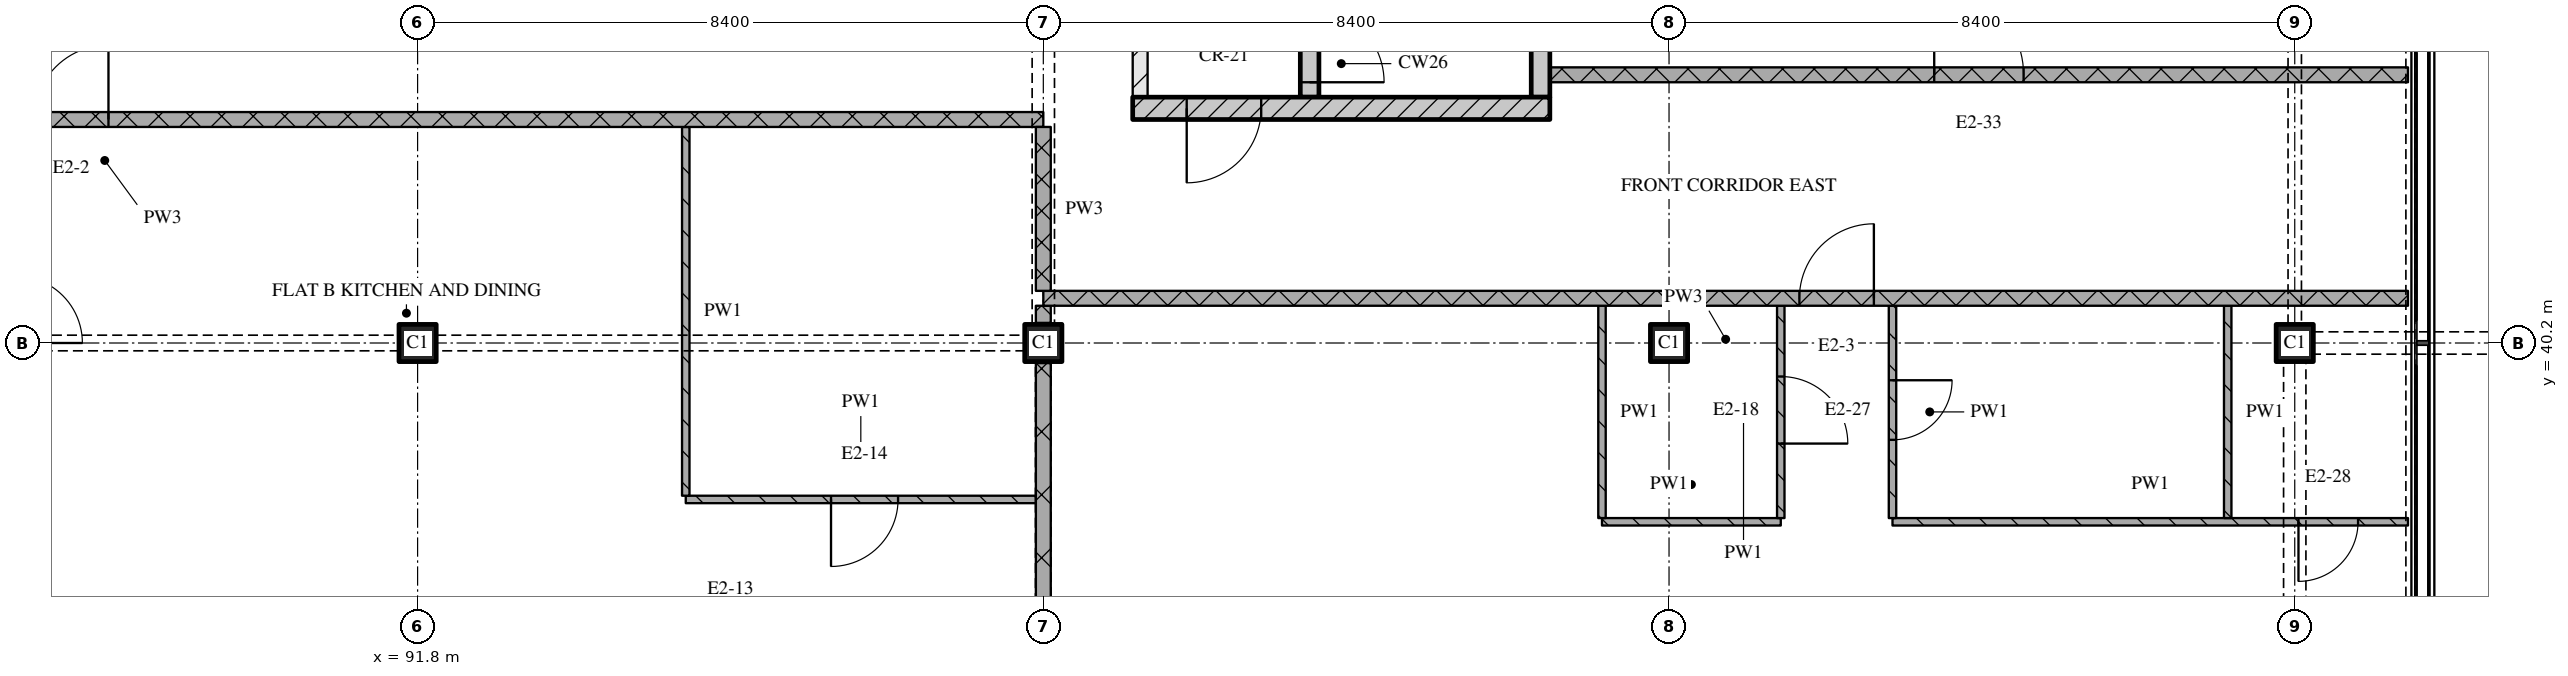
"""IFC4 building model, lengths in metres.
Left out: names, types, materials, properties, quantities, classifications, styles, units other than length and angle.
Written with IfcOpenShell. Run it as: python <this file> out.ifc"""

import sys

from ifc_helpers import new_model, si_unit, direction, frame, frame_2d, origin, origin_2d, place, context, subcontext, project, spatial, rectangle, extrude, element, fill, save


model = new_model("IFC4")
c1 = context("Model", 3, precision=1e-05, world=origin(), true_north=direction((0.0, 1.0)))
c2 = subcontext(c1, "Body", "Model", "MODEL_VIEW")
j1 = project(units=[si_unit("LENGTHUNIT", "METRE"), si_unit("PLANEANGLEUNIT", "RADIAN")], contexts=[c1])
p1 = place(None, origin())
s1 = spatial("IfcSite", under=j1, at=p1, CompositionType="ELEMENT")
p2 = place(p1, origin())
s2 = spatial("IfcBuilding", under=s1, at=p2, CompositionType="ELEMENT")
p3 = place(p2, frame((0.0, 0.0, 270.75)))
s3 = spatial("IfcBuildingStorey", under=s2, at=p3, CompositionType="ELEMENT", Elevation=270.75)
for number, where, z_axis, x_axis in (
    (1, (91.8, 40.2, 0.0), (0.0, 0.0, 1.0), (1.0, 0.0, 0.0)),
    (2, (100.2, 40.2, 0.0), (0.0, 0.0, 1.0), (1.0, 0.0, 0.0)),
    (3, (108.6, 40.2, 0.0), (0.0, 0.0, 1.0), (1.0, 0.0, 0.0)),
    (4, (117.0, 40.2, 0.0), (0.0, 0.0, 1.0), (1.0, 0.0, 0.0)),
):
    element("IfcColumn", number, at=place(p3, frame(where, z_axis=z_axis, x_axis=x_axis)), inside=s3, PredefinedType="COLUMN", context=c2, shape_type="SweptSolid", body=[
        extrude(rectangle(XDim=0.5, YDim=0.5, at=origin_2d()), origin(), (0.0, 0.0, 1.0), 3.6),
    ])
p4 = place(p3, frame((101.4, 43.35, 0.0), z_axis=(0.0, 0.0, 1.0), x_axis=(1.0, 0.0, 0.0)))
e5 = element("IfcWall", 5, at=p4, inside=s3, PredefinedType="SOLIDWALL", context=c2, shape_type="SweptSolid", body=[
    extrude(rectangle(XDim=5.6, YDim=0.3, at=frame_2d((2.8, 0.0))), origin(), (0.0, 0.0, 1.0), 3.32),
])
p5 = place(p4, frame((0.725, 0.0, 0.0)))
e6 = element("IfcOpeningElement", 6, at=p5, cuts=e5, PredefinedType="OPENING", context=c2, shape_type="SweptSolid", body=[
    extrude(rectangle(XDim=1.0, YDim=2.1, at=frame_2d((0.5, 1.05))), frame((0.0, 0.16, 0.0), z_axis=(0.0, -1.0, 0.0), x_axis=(1.0, 0.0, 0.0)), (0.0, 0.0, 1.0), 0.32),
])
p6 = place(p3, frame((101.5, 43.5, 0.0), z_axis=(0.0, 0.0, 1.0), x_axis=(0.0, 1.0, 0.0)))
e7 = element("IfcWall", 7, at=p6, inside=s3, PredefinedType="PARTITIONING", context=c2, shape_type="SweptSolid", body=[
    extrude(rectangle(XDim=6.9, YDim=0.2, at=frame_2d((3.45, 0.0))), origin(), (0.0, 0.0, 1.0), 3.32),
])
p7 = place(p6, frame((1.0, 0.0, 0.0)))
e8 = element("IfcOpeningElement", 8, at=p7, cuts=e7, PredefinedType="OPENING", context=c2, shape_type="SweptSolid", body=[
    extrude(rectangle(XDim=1.0, YDim=2.1, at=frame_2d((0.5, 1.05))), frame((0.0, 0.11, 0.0), z_axis=(0.0, -1.0, 0.0), x_axis=(1.0, 0.0, 0.0)), (0.0, 0.0, 1.0), 0.22),
])
p8 = place(p3, frame((103.775, 43.5, 0.0), z_axis=(0.0, 0.0, 1.0), x_axis=(0.0, 1.0, 0.0)))
e9 = element("IfcWall", 9, at=p8, inside=s3, PredefinedType="SOLIDWALL", context=c2, shape_type="SweptSolid", body=[
    extrude(rectangle(XDim=6.9, YDim=0.25, at=frame_2d((3.45, 0.0))), origin(), (0.0, 0.0, 1.0), 3.32),
])
p9 = place(p8, frame((0.2, 0.0, 0.0)))
e10 = element("IfcOpeningElement", 10, at=p9, cuts=e9, PredefinedType="OPENING", context=c2, shape_type="SweptSolid", body=[
    extrude(rectangle(XDim=1.0, YDim=2.1, at=frame_2d((0.5, 1.05))), frame((0.0, 0.135, 0.0), z_axis=(0.0, -1.0, 0.0), x_axis=(1.0, 0.0, 0.0)), (0.0, 0.0, 1.0), 0.27),
])
p10 = place(p3, frame((106.875, 43.5, 0.0), z_axis=(0.0, 0.0, 1.0), x_axis=(0.0, 1.0, 0.0)))
e11 = element("IfcWall", 11, at=p10, inside=s3, PredefinedType="SOLIDWALL", context=c2, shape_type="SweptSolid", body=[
    extrude(rectangle(XDim=6.9, YDim=0.25, at=frame_2d((3.45, 0.0))), origin(), (0.0, 0.0, 1.0), 3.32),
])
p11 = place(p3, frame((107.7, 37.8, 0.0), z_axis=(0.0, 0.0, 1.0), x_axis=(1.0, 0.0, 0.0)))
e12 = element("IfcWall", 12, at=p11, inside=s3, PredefinedType="PARTITIONING", context=c2, shape_type="SweptSolid", body=[
    extrude(rectangle(XDim=2.4, YDim=0.1, at=frame_2d((1.2, 0.0))), origin(), (0.0, 0.0, 1.0), 3.32),
])
p12 = place(p3, frame((111.6, 37.8, 0.0), z_axis=(0.0, 0.0, 1.0), x_axis=(1.0, 0.0, 0.0)))
e13 = element("IfcWall", 13, at=p12, inside=s3, PredefinedType="PARTITIONING", context=c2, shape_type="SweptSolid", body=[
    extrude(rectangle(XDim=6.92, YDim=0.1, at=frame_2d((3.46, 0.0))), origin(), (0.0, 0.0, 1.0), 3.32),
])
p13 = place(p12, frame((5.45, 0.0, 0.0)))
e14 = element("IfcOpeningElement", 14, at=p13, cuts=e13, PredefinedType="OPENING", context=c2, shape_type="SweptSolid", body=[
    extrude(rectangle(XDim=0.8, YDim=2.1, at=frame_2d((0.4, 1.05))), frame((0.0, 0.06, 0.0), z_axis=(0.0, -1.0, 0.0), x_axis=(1.0, 0.0, 0.0)), (0.0, 0.0, 1.0), 0.12),
])
p14 = place(p3, frame((95.4, 38.1, 0.0), z_axis=(0.0, 0.0, 1.0), x_axis=(1.0, 0.0, 0.0)))
e15 = element("IfcWall", 15, at=p14, inside=s3, PredefinedType="PARTITIONING", context=c2, shape_type="SweptSolid", body=[
    extrude(rectangle(XDim=4.7, YDim=0.1, at=frame_2d((2.35, 0.0))), origin(), (0.0, 0.0, 1.0), 3.32),
])
p15 = place(p14, frame((1.95, 0.0, 0.0)))
e16 = element("IfcOpeningElement", 16, at=p15, cuts=e15, PredefinedType="OPENING", context=c2, shape_type="SweptSolid", body=[
    extrude(rectangle(XDim=0.9, YDim=2.1, at=frame_2d((0.45, 1.05))), frame((0.0, 0.06, 0.0), z_axis=(0.0, -1.0, 0.0), x_axis=(1.0, 0.0, 0.0)), (0.0, 0.0, 1.0), 0.12),
])
p16 = place(p3, frame((118.52, 40.8, 0.0), z_axis=(0.0, 0.0, 1.0), x_axis=(-1.0, 0.0, 0.0)))
e17 = element("IfcWall", 17, at=p16, inside=s3, PredefinedType="PARTITIONING", context=c2, shape_type="SweptSolid", body=[
    extrude(rectangle(XDim=18.32, YDim=0.2, at=frame_2d((9.16, 0.0))), origin(), (0.0, 0.0, 1.0), 3.32),
])
p17 = place(p16, frame((7.17, 0.0, 0.0)))
e18 = element("IfcOpeningElement", 18, at=p17, cuts=e17, PredefinedType="OPENING", context=c2, shape_type="SweptSolid", body=[
    extrude(rectangle(XDim=1.0, YDim=2.1, at=frame_2d((0.5, 1.05))), frame((0.0, 0.11, 0.0), z_axis=(0.0, -1.0, 0.0), x_axis=(1.0, 0.0, 0.0)), (0.0, 0.0, 1.0), 0.22),
])
p18 = place(p3, frame((100.2, 43.2, 0.0), z_axis=(0.0, 0.0, 1.0), x_axis=(-1.0, 0.0, 0.0)))
e19 = element("IfcWall", 19, at=p18, inside=s3, PredefinedType="PARTITIONING", context=c2, shape_type="SweptSolid", body=[
    extrude(rectangle(XDim=25.2, YDim=0.2, at=frame_2d((12.6, 0.0))), origin(), (0.0, 0.0, 1.0), 3.32),
])
p19 = place(p18, frame((12.55, 0.0, 0.0)))
e20 = element("IfcOpeningElement", 20, at=p19, cuts=e19, PredefinedType="OPENING", context=c2, shape_type="SweptSolid", body=[
    extrude(rectangle(XDim=1.0, YDim=2.1, at=frame_2d((0.5, 1.05))), frame((0.0, 0.11, 0.0), z_axis=(0.0, -1.0, 0.0), x_axis=(1.0, 0.0, 0.0)), (0.0, 0.0, 1.0), 0.22),
])
p20 = place(p3, frame((107.0, 43.8, 0.0), z_axis=(0.0, 0.0, 1.0), x_axis=(1.0, 0.0, 0.0)))
e21 = element("IfcWall", 21, at=p20, inside=s3, PredefinedType="PARTITIONING", context=c2, shape_type="SweptSolid", body=[
    extrude(rectangle(XDim=11.52, YDim=0.2, at=frame_2d((5.76, 0.0))), origin(), (0.0, 0.0, 1.0), 3.32),
])
p21 = place(p20, frame((5.16, 0.0, 0.0)))
e22 = element("IfcOpeningElement", 22, at=p21, cuts=e21, PredefinedType="OPENING", context=c2, shape_type="SweptSolid", body=[
    extrude(rectangle(XDim=1.2, YDim=2.1, at=frame_2d((0.6, 1.05))), frame((0.0, 0.11, 0.0), z_axis=(0.0, -1.0, 0.0), x_axis=(1.0, 0.0, 0.0)), (0.0, 0.0, 1.0), 0.22),
])
p22 = place(p3, frame((95.4, 43.1, 0.0), z_axis=(0.0, 0.0, 1.0), x_axis=(0.0, -1.0, 0.0)))
e23 = element("IfcWall", 23, at=p22, inside=s3, PredefinedType="PARTITIONING", context=c2, shape_type="SweptSolid", body=[
    extrude(rectangle(XDim=4.95, YDim=0.1, at=frame_2d((2.475, 0.0))), origin(), (0.0, 0.0, 1.0), 3.32),
])
p23 = place(p3, frame((100.2, 43.1, 0.0), z_axis=(0.0, 0.0, 1.0), x_axis=(0.0, -1.0, 0.0)))
e24 = element("IfcWall", 24, at=p23, inside=s3, PredefinedType="PARTITIONING", context=c2, shape_type="SweptSolid", body=[
    extrude(rectangle(XDim=2.2, YDim=0.2, at=frame_2d((1.1, 0.0))), origin(), (0.0, 0.0, 1.0), 2.53),
])
p24 = place(p3, frame((100.2, 39.93, 0.0), z_axis=(0.0, 0.0, 1.0), x_axis=(0.0, -1.0, 0.0)))
e25 = element("IfcWall", 25, at=p24, inside=s3, PredefinedType="PARTITIONING", context=c2, shape_type="SweptSolid", body=[
    extrude(rectangle(XDim=7.86, YDim=0.2, at=frame_2d((3.93, 0.0))), origin(), (0.0, 0.0, 1.0), 2.77),
])
p25 = place(p3, frame((100.2, 40.7, 0.0), z_axis=(0.0, 0.0, 1.0), x_axis=(0.0, -1.0, 0.0)))
e26 = element("IfcWall", 26, at=p25, inside=s3, PredefinedType="PARTITIONING", context=c2, shape_type="SweptSolid", body=[
    extrude(rectangle(XDim=0.23, YDim=0.2, at=frame_2d((0.115, 0.0))), origin(), (0.0, 0.0, 1.0), 3.32),
])
p26 = place(p3, frame((107.7, 40.7, 0.0), z_axis=(0.0, 0.0, 1.0), x_axis=(0.0, -1.0, 0.0)))
e27 = element("IfcWall", 27, at=p26, inside=s3, PredefinedType="PARTITIONING", context=c2, shape_type="SweptSolid", body=[
    extrude(rectangle(XDim=2.85, YDim=0.1, at=frame_2d((1.425, 0.0))), origin(), (0.0, 0.0, 1.0), 3.32),
])
p27 = place(p3, frame((110.1, 37.85, 0.0), z_axis=(0.0, 0.0, 1.0), x_axis=(0.0, 1.0, 0.0)))
e28 = element("IfcWall", 28, at=p27, inside=s3, PredefinedType="PARTITIONING", context=c2, shape_type="SweptSolid", body=[
    extrude(rectangle(XDim=2.85, YDim=0.1, at=frame_2d((1.425, 0.0))), origin(), (0.0, 0.0, 1.0), 3.32),
])
p28 = place(p27, frame((1.0, 0.0, 0.0)))
e29 = element("IfcOpeningElement", 29, at=p28, cuts=e28, PredefinedType="OPENING", context=c2, shape_type="SweptSolid", body=[
    extrude(rectangle(XDim=0.9, YDim=2.1, at=frame_2d((0.45, 1.05))), frame((0.0, 0.06, 0.0), z_axis=(0.0, -1.0, 0.0), x_axis=(1.0, 0.0, 0.0)), (0.0, 0.0, 1.0), 0.12),
])
p29 = place(p3, frame((111.6, 40.7, 0.0), z_axis=(0.0, 0.0, 1.0), x_axis=(0.0, -1.0, 0.0)))
e30 = element("IfcWall", 30, at=p29, inside=s3, PredefinedType="PARTITIONING", context=c2, shape_type="SweptSolid", body=[
    extrude(rectangle(XDim=2.85, YDim=0.1, at=frame_2d((1.425, 0.0))), origin(), (0.0, 0.0, 1.0), 3.32),
])
p30 = place(p29, frame((1.0, 0.0, 0.0)))
e31 = element("IfcOpeningElement", 31, at=p30, cuts=e30, PredefinedType="OPENING", context=c2, shape_type="SweptSolid", body=[
    extrude(rectangle(XDim=0.8, YDim=2.1, at=frame_2d((0.4, 1.05))), frame((0.0, 0.06, 0.0), z_axis=(0.0, -1.0, 0.0), x_axis=(1.0, 0.0, 0.0)), (0.0, 0.0, 1.0), 0.12),
])
p31 = place(p3, frame((116.1, 40.7, 0.0), z_axis=(0.0, 0.0, 1.0), x_axis=(0.0, -1.0, 0.0)))
e32 = element("IfcWall", 32, at=p31, inside=s3, PredefinedType="PARTITIONING", context=c2, shape_type="SweptSolid", body=[
    extrude(rectangle(XDim=2.85, YDim=0.1, at=frame_2d((1.425, 0.0))), origin(), (0.0, 0.0, 1.0), 3.32),
])
p32 = place(p5, origin())
e33 = element("IfcDoor", 33, at=p32, inside=s3, OperationType="SINGLE_SWING_RIGHT", PredefinedType="DOOR", context=c2, shape_type="SweptSolid", body=[
    extrude(rectangle(XDim=1.0, YDim=2.1, at=frame_2d((0.5, 1.05))), frame((0.0, 0.025, 0.0), z_axis=(0.0, -1.0, 0.0), x_axis=(1.0, 0.0, 0.0)), (0.0, 0.0, 1.0), 0.05),
])
fill(e6, e33)
p33 = place(p9, origin())
e34 = element("IfcDoor", 34, at=p33, inside=s3, OperationType="SINGLE_SWING_RIGHT", PredefinedType="DOOR", context=c2, shape_type="SweptSolid", body=[
    extrude(rectangle(XDim=1.0, YDim=2.1, at=frame_2d((0.5, 1.05))), frame((0.0, 0.025, 0.0), z_axis=(0.0, -1.0, 0.0), x_axis=(1.0, 0.0, 0.0)), (0.0, 0.0, 1.0), 0.05),
])
fill(e10, e34)
p34 = place(p13, origin())
e35 = element("IfcDoor", 35, at=p34, inside=s3, OperationType="SINGLE_SWING_RIGHT", PredefinedType="DOOR", context=c2, shape_type="SweptSolid", body=[
    extrude(rectangle(XDim=0.8, YDim=2.1, at=frame_2d((0.4, 1.05))), frame((0.0, 0.025, 0.0), z_axis=(0.0, -1.0, 0.0), x_axis=(1.0, 0.0, 0.0)), (0.0, 0.0, 1.0), 0.05),
])
fill(e14, e35)
p35 = place(p15, origin())
e36 = element("IfcDoor", 36, at=p35, inside=s3, OperationType="SINGLE_SWING_RIGHT", PredefinedType="DOOR", context=c2, shape_type="SweptSolid", body=[
    extrude(rectangle(XDim=0.9, YDim=2.1, at=frame_2d((0.45, 1.05))), frame((0.0, 0.025, 0.0), z_axis=(0.0, -1.0, 0.0), x_axis=(1.0, 0.0, 0.0)), (0.0, 0.0, 1.0), 0.05),
])
fill(e16, e36)
p36 = place(p17, origin())
e37 = element("IfcDoor", 37, at=p36, inside=s3, OperationType="SINGLE_SWING_RIGHT", PredefinedType="DOOR", context=c2, shape_type="SweptSolid", body=[
    extrude(rectangle(XDim=1.0, YDim=2.1, at=frame_2d((0.5, 1.05))), frame((0.0, 0.025, 0.0), z_axis=(0.0, -1.0, 0.0), x_axis=(1.0, 0.0, 0.0)), (0.0, 0.0, 1.0), 0.05),
])
fill(e18, e37)
p37 = place(p19, origin())
e38 = element("IfcDoor", 38, at=p37, inside=s3, OperationType="SINGLE_SWING_RIGHT", PredefinedType="DOOR", context=c2, shape_type="SweptSolid", body=[
    extrude(rectangle(XDim=1.0, YDim=2.1, at=frame_2d((0.5, 1.05))), frame((0.0, 0.025, 0.0), z_axis=(0.0, -1.0, 0.0), x_axis=(1.0, 0.0, 0.0)), (0.0, 0.0, 1.0), 0.05),
])
fill(e20, e38)
p38 = place(p21, origin())
e39 = element("IfcDoor", 39, at=p38, inside=s3, OperationType="SINGLE_SWING_LEFT", PredefinedType="DOOR", context=c2, shape_type="SweptSolid", body=[
    extrude(rectangle(XDim=1.2, YDim=2.1, at=frame_2d((0.6, 1.05))), frame((0.0, 0.025, 0.0), z_axis=(0.0, -1.0, 0.0), x_axis=(1.0, 0.0, 0.0)), (0.0, 0.0, 1.0), 0.05),
])
fill(e22, e39)
p39 = place(p28, origin())
e40 = element("IfcDoor", 40, at=p39, inside=s3, OperationType="SINGLE_SWING_RIGHT", PredefinedType="DOOR", context=c2, shape_type="SweptSolid", body=[
    extrude(rectangle(XDim=0.9, YDim=2.1, at=frame_2d((0.45, 1.05))), frame((0.0, 0.025, 0.0), z_axis=(0.0, -1.0, 0.0), x_axis=(1.0, 0.0, 0.0)), (0.0, 0.0, 1.0), 0.05),
])
fill(e29, e40)
p40 = place(p30, origin())
e41 = element("IfcDoor", 41, at=p40, inside=s3, OperationType="SINGLE_SWING_LEFT", PredefinedType="DOOR", context=c2, shape_type="SweptSolid", body=[
    extrude(rectangle(XDim=0.8, YDim=2.1, at=frame_2d((0.4, 1.05))), frame((0.0, 0.025, 0.0), z_axis=(0.0, -1.0, 0.0), x_axis=(1.0, 0.0, 0.0)), (0.0, 0.0, 1.0), 0.05),
])
fill(e31, e41)
save(model, sys.argv[1])
